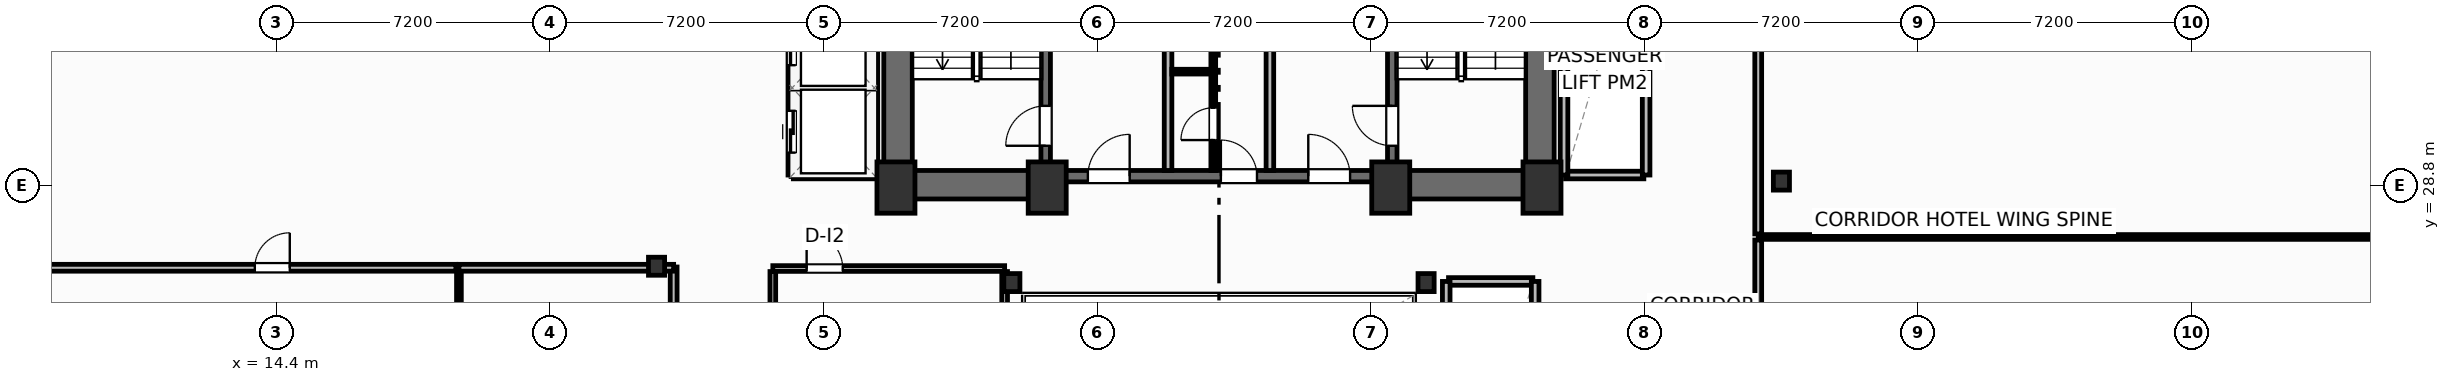
"""IFC4 building model, lengths in metres.
Left out: names, types, materials, properties, quantities, classifications, styles, units other than length and angle.
Written with IfcOpenShell. Run it as: python <this file> out.ifc"""

import sys

from ifc_helpers import new_model, si_unit, direction, frame, frame_2d, origin, origin_2d, place, context, subcontext, project, spatial, rectangle, i_section, extrude, element, fill, save


model = new_model("IFC4")
c1 = context("Model", 3, precision=1e-05, world=origin(), true_north=direction((0.0, 1.0)))
c2 = subcontext(c1, "Body", "Model", "MODEL_VIEW")
j1 = project(units=[si_unit("LENGTHUNIT", "METRE"), si_unit("PLANEANGLEUNIT", "RADIAN")], contexts=[c1])
p1 = place(None, origin())
s1 = spatial("IfcSite", under=j1, at=p1, CompositionType="ELEMENT")
p2 = place(p1, origin())
s2 = spatial("IfcBuilding", under=s1, at=p2, CompositionType="ELEMENT")
p3 = place(p2, frame((0.0, 0.0, 94.7)))
s3 = spatial("IfcBuildingStorey", under=s2, at=p3, CompositionType="ELEMENT", Elevation=94.7)
for number, where, z_axis, x_axis in (
    (1, (30.7, 28.75, 0.0), (0.0, 0.0, 1.0), (1.0, 0.0, 0.0)),
    (2, (34.68, 28.75, 0.0), (0.0, 0.0, 1.0), (1.0, 0.0, 0.0)),
    (3, (43.72, 28.75, 0.0), (0.0, 0.0, 1.0), (1.0, 0.0, 0.0)),
    (4, (47.7, 28.75, 0.0), (0.0, 0.0, 1.0), (1.0, 0.0, 0.0)),
):
    element("IfcColumn", number, at=place(p3, frame(where, z_axis=z_axis, x_axis=x_axis)), inside=s3, PredefinedType="COLUMN", context=c2, shape_type="SweptSolid", body=[
        extrude(rectangle(XDim=1.0, YDim=1.35, at=origin_2d()), origin(), (0.0, 0.0, 1.0), 3.7),
    ])
for number, where, z_axis, x_axis in (
    (5, (33.75, 26.25, 0.0), (0.0, 0.0, 1.0), (1.0, 0.0, 0.0)),
    (6, (44.65, 26.25, 0.0), (0.0, 0.0, 1.0), (1.0, 0.0, 0.0)),
    (7, (24.4, 26.68, 0.0), (0.0, 0.0, 1.0), (1.0, 0.0, 0.0)),
    (8, (54.0, 28.92, 0.0), (0.0, 0.0, 1.0), (1.0, 0.0, 0.0)),
):
    element("IfcColumn", number, at=place(p3, frame(where, z_axis=z_axis, x_axis=x_axis)), inside=s3, PredefinedType="COLUMN", context=c2, shape_type="SweptSolid", body=[
        extrude(i_section(OverallWidth=0.424, OverallDepth=0.474, WebThickness=0.048, FlangeThickness=0.077, FilletRadius=0.025, at=origin_2d()), origin(), (0.0, 0.0, 1.0), 3.7),
    ])
for number, where, z_axis, x_axis in (
    (9, (30.755, 29.2, 0.0), (0.0, 0.0, 1.0), (0.0, 1.0, 0.0)),
    (10, (47.645, 29.2, 0.0), (0.0, 0.0, 1.0), (0.0, 1.0, 0.0)),
):
    element("IfcWall", number, at=place(p3, frame(where, z_axis=z_axis, x_axis=x_axis)), inside=s3, PredefinedType="SHEAR", context=c2, shape_type="SweptSolid", body=[
        extrude(rectangle(XDim=9.22, YDim=0.75, at=frame_2d((4.61, 0.0))), origin(), (0.0, 0.0, 1.0), 3.45),
    ])
p4 = place(p3, frame((30.38, 28.825, 0.0), z_axis=(0.0, 0.0, 1.0), x_axis=(1.0, 0.0, 0.0)))
e11 = element("IfcWall", 11, at=p4, inside=s3, PredefinedType="SHEAR", context=c2, shape_type="SweptSolid", body=[
    extrude(rectangle(XDim=4.42, YDim=0.75, at=frame_2d((2.21, 0.0))), origin(), (0.0, 0.0, 1.0), 3.45),
])
p5 = place(p3, frame((43.6, 28.825, 0.0), z_axis=(0.0, 0.0, 1.0), x_axis=(1.0, 0.0, 0.0)))
e12 = element("IfcWall", 12, at=p5, inside=s3, PredefinedType="SHEAR", context=c2, shape_type="SweptSolid", body=[
    extrude(rectangle(XDim=4.42, YDim=0.75, at=frame_2d((2.21, 0.0))), origin(), (0.0, 0.0, 1.0), 3.45),
])
p6 = place(p3, frame((34.8, 29.05, 0.0), z_axis=(0.0, 0.0, 1.0), x_axis=(1.0, 0.0, 0.0)))
e13 = element("IfcWall", 13, at=p6, inside=s3, PredefinedType="SHEAR", context=c2, shape_type="SweptSolid", body=[
    extrude(rectangle(XDim=8.8, YDim=0.3, at=frame_2d((4.4, 0.0))), origin(), (0.0, 0.0, 1.0), 3.45),
])
p7 = place(p6, frame((0.95, 0.0, 0.0)))
e14 = element("IfcOpeningElement", 14, at=p7, cuts=e13, PredefinedType="OPENING", context=c2, shape_type="SweptSolid", body=[
    extrude(rectangle(XDim=1.1, YDim=2.15, at=frame_2d((0.55, 1.075))), frame((0.0, 0.16, 0.0), z_axis=(0.0, -1.0, 0.0), x_axis=(1.0, 0.0, 0.0)), (0.0, 0.0, 1.0), 0.32),
])
p8 = place(p6, frame((6.75, 0.0, 0.0)))
e15 = element("IfcOpeningElement", 15, at=p8, cuts=e13, PredefinedType="OPENING", context=c2, shape_type="SweptSolid", body=[
    extrude(rectangle(XDim=1.1, YDim=2.15, at=frame_2d((0.55, 1.075))), frame((0.0, 0.16, 0.0), z_axis=(0.0, -1.0, 0.0), x_axis=(1.0, 0.0, 0.0)), (0.0, 0.0, 1.0), 0.32),
])
p9 = place(p6, frame((4.45, 0.0, 0.0)))
e16 = element("IfcOpeningElement", 16, at=p9, cuts=e13, PredefinedType="OPENING", context=c2, shape_type="SweptSolid", body=[
    extrude(rectangle(XDim=0.95, YDim=2.15, at=frame_2d((0.475, 1.075))), frame((0.0, 0.16, 0.0), z_axis=(0.0, -1.0, 0.0), x_axis=(1.0, 0.0, 0.0)), (0.0, 0.0, 1.0), 0.32),
])
p10 = place(p3, frame((34.64, 29.2, 0.0), z_axis=(0.0, 0.0, 1.0), x_axis=(0.0, 1.0, 0.0)))
e17 = element("IfcWall", 17, at=p10, inside=s3, PredefinedType="SHEAR", context=c2, shape_type="SweptSolid", body=[
    extrude(rectangle(XDim=9.22, YDim=0.25, at=frame_2d((4.61, 0.0))), origin(), (0.0, 0.0, 1.0), 3.45),
])
p11 = place(p10, frame((0.65, 0.0, 0.0)))
e18 = element("IfcOpeningElement", 18, at=p11, cuts=e17, PredefinedType="OPENING", context=c2, shape_type="SweptSolid", body=[
    extrude(rectangle(XDim=1.05, YDim=2.15, at=frame_2d((0.525, 1.075))), frame((0.0, 0.135, 0.0), z_axis=(0.0, -1.0, 0.0), x_axis=(1.0, 0.0, 0.0)), (0.0, 0.0, 1.0), 0.27),
])
p12 = place(p3, frame((43.76, 29.2, 0.0), z_axis=(0.0, 0.0, 1.0), x_axis=(0.0, 1.0, 0.0)))
e19 = element("IfcWall", 19, at=p12, inside=s3, PredefinedType="SHEAR", context=c2, shape_type="SweptSolid", body=[
    extrude(rectangle(XDim=9.22, YDim=0.25, at=frame_2d((4.61, 0.0))), origin(), (0.0, 0.0, 1.0), 3.45),
])
p13 = place(p12, frame((0.65, 0.0, 0.0)))
e20 = element("IfcOpeningElement", 20, at=p13, cuts=e19, PredefinedType="OPENING", context=c2, shape_type="SweptSolid", body=[
    extrude(rectangle(XDim=1.05, YDim=2.15, at=frame_2d((0.525, 1.075))), frame((0.0, 0.135, 0.0), z_axis=(0.0, -1.0, 0.0), x_axis=(1.0, 0.0, 0.0)), (0.0, 0.0, 1.0), 0.27),
])
p14 = place(p3, frame((-0.094, 26.64, 0.0), z_axis=(0.0, 0.0, 1.0), x_axis=(1.0, 0.0, 0.0)))
e21 = element("IfcWall", 21, at=p14, inside=s3, PredefinedType="PARTITIONING", context=c2, shape_type="SweptSolid", body=[
    extrude(rectangle(XDim=19.214, YDim=0.18, at=frame_2d((9.607, 0.0))), origin(), (0.0, 0.0, 1.0), 3.45),
])
p15 = place(p14, frame((13.923, 0.0, 0.0)))
e22 = element("IfcOpeningElement", 22, at=p15, cuts=e21, PredefinedType="OPENING", context=c2, shape_type="SweptSolid", body=[
    extrude(rectangle(XDim=0.92, YDim=2.05, at=frame_2d((0.46, 1.025))), frame((0.0, 0.1, 0.0), z_axis=(0.0, -1.0, 0.0), x_axis=(1.0, 0.0, 0.0)), (0.0, 0.0, 1.0), 0.2),
])
p16 = place(p3, frame((24.85, 19.24, 0.0), z_axis=(0.0, 0.0, 1.0), x_axis=(0.0, 1.0, 0.0)))
e23 = element("IfcWall", 23, at=p16, inside=s3, PredefinedType="PARTITIONING", context=c2, shape_type="SweptSolid", body=[
    extrude(rectangle(XDim=7.42, YDim=0.18, at=frame_2d((3.71, 0.0))), origin(), (0.0, 0.0, 1.0), 3.45),
])
p17 = place(p16, frame((2.4, 0.0, 0.0)))
e24 = element("IfcOpeningElement", 24, at=p17, cuts=e23, PredefinedType="OPENING", context=c2, shape_type="SweptSolid", body=[
    extrude(rectangle(XDim=0.92, YDim=2.05, at=frame_2d((0.46, 1.025))), frame((0.0, 0.1, 0.0), z_axis=(0.0, -1.0, 0.0), x_axis=(1.0, 0.0, 0.0)), (0.0, 0.0, 1.0), 0.2),
])
p18 = place(p3, frame((19.2, 19.24, 0.0), z_axis=(0.0, 0.0, 1.0), x_axis=(0.0, 1.0, 0.0)))
e25 = element("IfcWall", 25, at=p18, inside=s3, PredefinedType="PARTITIONING", context=c2, shape_type="SweptSolid", body=[
    extrude(rectangle(XDim=7.42, YDim=0.125, at=frame_2d((3.71, 0.0))), origin(), (0.0, 0.0, 1.0), 3.45),
])
p19 = place(p3, frame((19.2, 26.64, 0.0), z_axis=(0.0, 0.0, 1.0), x_axis=(1.0, 0.0, 0.0)))
e26 = element("IfcWall", 26, at=p19, inside=s3, PredefinedType="PARTITIONING", context=c2, shape_type="SweptSolid", body=[
    extrude(rectangle(XDim=5.65, YDim=0.18, at=frame_2d((2.825, 0.0))), origin(), (0.0, 0.0, 1.0), 2.662),
])
p20 = place(p3, frame((53.39, 19.3, 0.0), z_axis=(0.0, 0.0, 1.0), x_axis=(0.0, 1.0, 0.0)))
e27 = element("IfcWall", 27, at=p20, inside=s3, PredefinedType="PARTITIONING", context=c2, shape_type="SweptSolid", body=[
    extrude(rectangle(XDim=8.07, YDim=0.18, at=frame_2d((4.035, 0.0))), origin(), (0.0, 0.0, 1.0), 3.45),
])
p21 = place(p20, frame((2.2, 0.0, 0.0)))
e28 = element("IfcOpeningElement", 28, at=p21, cuts=e27, PredefinedType="OPENING", context=c2, shape_type="SweptSolid", body=[
    extrude(rectangle(XDim=0.92, YDim=2.05, at=frame_2d((0.46, 1.025))), frame((0.0, 0.1, 0.0), z_axis=(0.0, -1.0, 0.0), x_axis=(1.0, 0.0, 0.0)), (0.0, 0.0, 1.0), 0.2),
])
p22 = place(p3, frame((53.39, 27.53, 0.0), z_axis=(0.0, 0.0, 1.0), x_axis=(0.0, 1.0, 0.0)))
e29 = element("IfcWall", 29, at=p22, inside=s3, PredefinedType="PARTITIONING", context=c2, shape_type="SweptSolid", body=[
    extrude(rectangle(XDim=11.67, YDim=0.18, at=frame_2d((5.835, 0.0))), origin(), (0.0, 0.0, 1.0), 3.45),
])
p23 = place(p22, frame((5.8, 0.0, 0.0)))
e30 = element("IfcOpeningElement", 30, at=p23, cuts=e29, PredefinedType="OPENING", context=c2, shape_type="SweptSolid", body=[
    extrude(rectangle(XDim=0.92, YDim=2.05, at=frame_2d((0.46, 1.025))), frame((0.0, 0.1, 0.0), z_axis=(0.0, -1.0, 0.0), x_axis=(1.0, 0.0, 0.0)), (0.0, 0.0, 1.0), 0.2),
])
p24 = place(p3, frame((53.39, 27.45, 0.0), z_axis=(0.0, 0.0, 1.0), x_axis=(1.0, 0.0, 0.0)))
e31 = element("IfcWall", 31, at=p24, inside=s3, PredefinedType="PARTITIONING", context=c2, shape_type="SweptSolid", body=[
    extrude(rectangle(XDim=23.61, YDim=0.125, at=frame_2d((11.805, 0.0))), origin(), (0.0, 0.0, 1.0), 3.45),
])
for number, where, z_axis, x_axis in (
    (32, (37.86, 29.2, 0.0), (0.0, 0.0, 1.0), (0.0, 1.0, 0.0)),
    (33, (40.54, 29.2, 0.0), (0.0, 0.0, 1.0), (0.0, 1.0, 0.0)),
):
    element("IfcWall", number, at=place(p3, frame(where, z_axis=z_axis, x_axis=x_axis)), inside=s3, PredefinedType="PARTITIONING", context=c2, shape_type="SweptSolid", body=[
        extrude(rectangle(XDim=5.18, YDim=0.2, at=frame_2d((2.59, 0.0))), origin(), (0.0, 0.0, 1.0), 3.45),
    ])
p25 = place(p3, frame((37.96, 31.8, 0.0), z_axis=(0.0, 0.0, 1.0), x_axis=(1.0, 0.0, 0.0)))
e34 = element("IfcWall", 34, at=p25, inside=s3, PredefinedType="PARTITIONING", context=c2, shape_type="SweptSolid", body=[
    extrude(rectangle(XDim=1.09, YDim=0.125, at=frame_2d((0.545, 0.0))), origin(), (0.0, 0.0, 1.0), 3.45),
])
p26 = place(p3, frame((39.05, 29.2, 0.0), z_axis=(0.0, 0.0, 1.0), x_axis=(0.0, 1.0, 0.0)))
e35 = element("IfcWall", 35, at=p26, inside=s3, PredefinedType="PARTITIONING", context=c2, shape_type="SweptSolid", body=[
    extrude(rectangle(XDim=5.22, YDim=0.125, at=frame_2d((2.61, 0.0))), origin(), (0.0, 0.0, 1.0), 3.45),
])
p27 = place(p26, frame((0.8, 0.0, 0.0)))
e36 = element("IfcOpeningElement", 36, at=p27, cuts=e35, PredefinedType="OPENING", context=c2, shape_type="SweptSolid", body=[
    extrude(rectangle(XDim=0.85, YDim=2.05, at=frame_2d((0.425, 1.025))), frame((0.0, 0.073, 0.0), z_axis=(0.0, -1.0, 0.0), x_axis=(1.0, 0.0, 0.0)), (0.0, 0.0, 1.0), 0.145),
])
p28 = place(p26, frame((3.4, 0.0, 0.0)))
e37 = element("IfcOpeningElement", 37, at=p28, cuts=e35, PredefinedType="OPENING", context=c2, shape_type="SweptSolid", body=[
    extrude(rectangle(XDim=0.85, YDim=2.05, at=frame_2d((0.425, 1.025))), frame((0.0, 0.073, 0.0), z_axis=(0.0, -1.0, 0.0), x_axis=(1.0, 0.0, 0.0)), (0.0, 0.0, 1.0), 0.145),
])
p29 = place(p3, frame((27.46, 26.62, 0.0), z_axis=(0.0, 0.0, 1.0), x_axis=(1.0, 0.0, 0.0)))
e38 = element("IfcWall", 38, at=p29, inside=s3, PredefinedType="PARTITIONING", context=c2, shape_type="SweptSolid", body=[
    extrude(rectangle(XDim=6.1, YDim=0.15, at=frame_2d((3.05, 0.0))), origin(), (0.0, 0.0, 1.0), 2.662),
])
p30 = place(p29, frame((0.89, 0.0, 0.0)))
e39 = element("IfcOpeningElement", 39, at=p30, cuts=e38, PredefinedType="OPENING", context=c2, shape_type="SweptSolid", body=[
    extrude(rectangle(XDim=0.95, YDim=2.05, at=frame_2d((0.475, 1.025))), frame((0.0, 0.085, 0.0), z_axis=(0.0, -1.0, 0.0), x_axis=(1.0, 0.0, 0.0)), (0.0, 0.0, 1.0), 0.17),
])
p31 = place(p3, frame((27.46, 19.38, 0.0), z_axis=(0.0, 0.0, 1.0), x_axis=(0.0, 1.0, 0.0)))
e40 = element("IfcWall", 40, at=p31, inside=s3, PredefinedType="PARTITIONING", context=c2, shape_type="SweptSolid", body=[
    extrude(rectangle(XDim=7.16, YDim=0.15, at=frame_2d((3.58, 0.0))), origin(), (0.0, 0.0, 1.0), 3.45),
])
p32 = place(p31, frame((1.1, 0.0, 0.0)))
e41 = element("IfcOpeningElement", 41, at=p32, cuts=e40, PredefinedType="OPENING", context=c2, shape_type="SweptSolid", body=[
    extrude(rectangle(XDim=0.9, YDim=2.05, at=frame_2d((0.45, 1.025))), frame((0.0, 0.085, 0.0), z_axis=(0.0, -1.0, 0.0), x_axis=(1.0, 0.0, 0.0)), (0.0, 0.0, 1.0), 0.17),
])
p33 = place(p3, frame((33.56, 19.38, 0.0), z_axis=(0.0, 0.0, 1.0), x_axis=(0.0, 1.0, 0.0)))
e42 = element("IfcWall", 42, at=p33, inside=s3, PredefinedType="PARTITIONING", context=c2, shape_type="SweptSolid", body=[
    extrude(rectangle(XDim=7.16, YDim=0.15, at=frame_2d((3.58, 0.0))), origin(), (0.0, 0.0, 1.0), 2.824),
])
p34 = place(p3, frame((28.02, 31.375, 0.0), z_axis=(0.0, 0.0, 1.0), x_axis=(1.0, 0.0, 0.0)))
e43 = element("IfcWall", 43, at=p34, inside=s3, PredefinedType="PARTITIONING", context=c2, shape_type="SweptSolid", body=[
    extrude(rectangle(XDim=2.06, YDim=0.2, at=frame_2d((1.03, 0.0))), origin(), (0.0, 0.0, 1.0), 3.45),
])
p35 = place(p3, frame((28.0, 29.08, 0.0), z_axis=(0.0, 0.0, 1.0), x_axis=(1.0, 0.0, 0.0)))
e44 = element("IfcWall", 44, at=p35, inside=s3, PredefinedType="PARTITIONING", context=c2, shape_type="SweptSolid", body=[
    extrude(rectangle(XDim=2.1, YDim=0.2, at=frame_2d((1.05, 0.0))), origin(), (0.0, 0.0, 1.0), 3.45),
])
p36 = place(p3, frame((30.12, 29.08, 0.0), z_axis=(0.0, 0.0, 1.0), x_axis=(0.0, 1.0, 0.0)))
e45 = element("IfcWall", 45, at=p36, inside=s3, PredefinedType="PARTITIONING", context=c2, shape_type="SweptSolid", body=[
    extrude(rectangle(XDim=6.89, YDim=0.2, at=frame_2d((3.445, 0.0))), origin(), (0.0, 0.0, 1.0), 3.45),
])
p37 = place(p3, frame((27.96, 29.08, 0.0), z_axis=(0.0, 0.0, 1.0), x_axis=(0.0, 1.0, 0.0)))
e46 = element("IfcWall", 46, at=p37, inside=s3, PredefinedType="PARTITIONING", context=c2, shape_type="SweptSolid", body=[
    extrude(rectangle(XDim=6.89, YDim=0.2, at=frame_2d((3.445, 0.0))), origin(), (0.0, 0.0, 1.0), 3.45),
])
p38 = place(p37, frame((0.59, 0.0, 0.0)))
e47 = element("IfcOpeningElement", 47, at=p38, cuts=e46, PredefinedType="OPENING", context=c2, shape_type="SweptSolid", body=[
    extrude(rectangle(XDim=1.1, YDim=2.15, at=frame_2d((0.55, 1.075))), frame((0.0, 0.11, 0.0), z_axis=(0.0, -1.0, 0.0), x_axis=(1.0, 0.0, 0.0)), (0.0, 0.0, 1.0), 0.22),
])
p39 = place(p37, frame((2.89, 0.0, 0.0)))
e48 = element("IfcOpeningElement", 48, at=p39, cuts=e46, PredefinedType="OPENING", context=c2, shape_type="SweptSolid", body=[
    extrude(rectangle(XDim=1.1, YDim=2.15, at=frame_2d((0.55, 1.075))), frame((0.0, 0.11, 0.0), z_axis=(0.0, -1.0, 0.0), x_axis=(1.0, 0.0, 0.0)), (0.0, 0.0, 1.0), 0.22),
])
p40 = place(p37, frame((5.19, 0.0, 0.0)))
e49 = element("IfcOpeningElement", 49, at=p40, cuts=e46, PredefinedType="OPENING", context=c2, shape_type="SweptSolid", body=[
    extrude(rectangle(XDim=1.1, YDim=2.15, at=frame_2d((0.55, 1.075))), frame((0.0, 0.11, 0.0), z_axis=(0.0, -1.0, 0.0), x_axis=(1.0, 0.0, 0.0)), (0.0, 0.0, 1.0), 0.22),
])
p41 = place(p3, frame((48.32, 31.375, 0.0), z_axis=(0.0, 0.0, 1.0), x_axis=(1.0, 0.0, 0.0)))
e50 = element("IfcWall", 50, at=p41, inside=s3, PredefinedType="PARTITIONING", context=c2, shape_type="SweptSolid", body=[
    extrude(rectangle(XDim=2.06, YDim=0.2, at=frame_2d((1.03, 0.0))), origin(), (0.0, 0.0, 1.0), 3.45),
])
p42 = place(p3, frame((48.32, 29.08, 0.0), z_axis=(0.0, 0.0, 1.0), x_axis=(1.0, 0.0, 0.0)))
e51 = element("IfcWall", 51, at=p42, inside=s3, PredefinedType="PARTITIONING", context=c2, shape_type="SweptSolid", body=[
    extrude(rectangle(XDim=2.06, YDim=0.2, at=frame_2d((1.03, 0.0))), origin(), (0.0, 0.0, 1.0), 2.662),
])
for number, where, z_axis, x_axis in (
    (52, (48.28, 29.08, 0.0), (0.0, 0.0, 1.0), (0.0, 1.0, 0.0)),
    (53, (50.44, 29.08, 0.0), (0.0, 0.0, 1.0), (0.0, 1.0, 0.0)),
):
    element("IfcWall", number, at=place(p3, frame(where, z_axis=z_axis, x_axis=x_axis)), inside=s3, PredefinedType="PARTITIONING", context=c2, shape_type="SweptSolid", body=[
        extrude(rectangle(XDim=6.89, YDim=0.2, at=frame_2d((3.445, 0.0))), origin(), (0.0, 0.0, 1.0), 3.45),
    ])
p43 = place(p3, frame((45.24, 26.28, 0.0), z_axis=(0.0, 0.0, 1.0), x_axis=(1.0, 0.0, 0.0)))
e54 = element("IfcWall", 54, at=p43, inside=s3, PredefinedType="PARTITIONING", context=c2, shape_type="SweptSolid", body=[
    extrude(rectangle(XDim=2.22, YDim=0.2, at=frame_2d((1.11, 0.0))), origin(), (0.0, 0.0, 1.0), 3.45),
])
for number, where, z_axis, x_axis in (
    (55, (45.18, 19.38, 0.0), (0.0, 0.0, 1.0), (0.0, 1.0, 0.0)),
    (56, (47.52, 19.38, 0.0), (0.0, 0.0, 1.0), (0.0, 1.0, 0.0)),
):
    element("IfcWall", number, at=place(p3, frame(where, z_axis=z_axis, x_axis=x_axis)), inside=s3, PredefinedType="PARTITIONING", context=c2, shape_type="SweptSolid", body=[
        extrude(rectangle(XDim=6.9, YDim=0.2, at=frame_2d((3.45, 0.0))), origin(), (0.0, 0.0, 1.0), 3.45),
    ])
p44 = place(p15, origin())
e57 = element("IfcDoor", 57, at=p44, inside=s3, OperationType="SINGLE_SWING_RIGHT", PredefinedType="DOOR", context=c2, shape_type="SweptSolid", body=[
    extrude(rectangle(XDim=0.92, YDim=2.05, at=frame_2d((0.46, 1.025))), frame((0.0, 0.025, 0.0), z_axis=(0.0, -1.0, 0.0), x_axis=(1.0, 0.0, 0.0)), (0.0, 0.0, 1.0), 0.05),
])
fill(e22, e57)
p45 = place(p11, origin())
e58 = element("IfcDoor", 58, at=p45, inside=s3, OperationType="SINGLE_SWING_LEFT", PredefinedType="DOOR", context=c2, shape_type="SweptSolid", body=[
    extrude(rectangle(XDim=1.05, YDim=2.15, at=frame_2d((0.525, 1.075))), frame((0.0, 0.025, 0.0), z_axis=(0.0, -1.0, 0.0), x_axis=(1.0, 0.0, 0.0)), (0.0, 0.0, 1.0), 0.05),
])
fill(e18, e58)
p46 = place(p13, origin())
e59 = element("IfcDoor", 59, at=p46, inside=s3, OperationType="SINGLE_SWING_RIGHT", PredefinedType="DOOR", context=c2, shape_type="SweptSolid", body=[
    extrude(rectangle(XDim=1.05, YDim=2.15, at=frame_2d((0.525, 1.075))), frame((0.0, 0.025, 0.0), z_axis=(0.0, -1.0, 0.0), x_axis=(1.0, 0.0, 0.0)), (0.0, 0.0, 1.0), 0.05),
])
fill(e20, e59)
p47 = place(p7, origin())
e60 = element("IfcDoor", 60, at=p47, inside=s3, OperationType="SINGLE_SWING_RIGHT", PredefinedType="DOOR", context=c2, shape_type="SweptSolid", body=[
    extrude(rectangle(XDim=1.1, YDim=2.15, at=frame_2d((0.55, 1.075))), frame((0.0, 0.025, 0.0), z_axis=(0.0, -1.0, 0.0), x_axis=(1.0, 0.0, 0.0)), (0.0, 0.0, 1.0), 0.05),
])
fill(e14, e60)
p48 = place(p8, origin())
e61 = element("IfcDoor", 61, at=p48, inside=s3, OperationType="SINGLE_SWING_LEFT", PredefinedType="DOOR", context=c2, shape_type="SweptSolid", body=[
    extrude(rectangle(XDim=1.1, YDim=2.15, at=frame_2d((0.55, 1.075))), frame((0.0, 0.025, 0.0), z_axis=(0.0, -1.0, 0.0), x_axis=(1.0, 0.0, 0.0)), (0.0, 0.0, 1.0), 0.05),
])
fill(e15, e61)
p49 = place(p27, origin())
e62 = element("IfcDoor", 62, at=p49, inside=s3, OperationType="SINGLE_SWING_LEFT", PredefinedType="DOOR", context=c2, shape_type="SweptSolid", body=[
    extrude(rectangle(XDim=0.85, YDim=2.05, at=frame_2d((0.425, 1.025))), frame((0.0, 0.025, 0.0), z_axis=(0.0, -1.0, 0.0), x_axis=(1.0, 0.0, 0.0)), (0.0, 0.0, 1.0), 0.05),
])
fill(e36, e62)
p50 = place(p9, origin())
e63 = element("IfcDoor", 63, at=p50, inside=s3, OperationType="SINGLE_SWING_LEFT", PredefinedType="DOOR", context=c2, shape_type="SweptSolid", body=[
    extrude(rectangle(XDim=0.95, YDim=2.15, at=frame_2d((0.475, 1.075))), frame((0.0, 0.025, 0.0), z_axis=(0.0, -1.0, 0.0), x_axis=(1.0, 0.0, 0.0)), (0.0, 0.0, 1.0), 0.05),
])
fill(e16, e63)
p51 = place(p30, origin())
e64 = element("IfcDoor", 64, at=p51, inside=s3, OperationType="SINGLE_SWING_LEFT", PredefinedType="DOOR", context=c2, shape_type="SweptSolid", body=[
    extrude(rectangle(XDim=0.95, YDim=2.05, at=frame_2d((0.475, 1.025))), frame((0.0, 0.025, 0.0), z_axis=(0.0, -1.0, 0.0), x_axis=(1.0, 0.0, 0.0)), (0.0, 0.0, 1.0), 0.05),
])
fill(e39, e64)
p52 = place(p38, origin())
e65 = element("IfcDoor", 65, at=p52, inside=s3, OperationType="SLIDING_TO_LEFT", PredefinedType="DOOR", context=c2, shape_type="SweptSolid", body=[
    extrude(rectangle(XDim=1.1, YDim=2.15, at=frame_2d((0.55, 1.075))), frame((0.0, 0.025, 0.0), z_axis=(0.0, -1.0, 0.0), x_axis=(1.0, 0.0, 0.0)), (0.0, 0.0, 1.0), 0.05),
])
fill(e47, e65)
p53 = place(p39, origin())
e66 = element("IfcDoor", 66, at=p53, inside=s3, OperationType="SLIDING_TO_LEFT", PredefinedType="DOOR", context=c2, shape_type="SweptSolid", body=[
    extrude(rectangle(XDim=1.1, YDim=2.15, at=frame_2d((0.55, 1.075))), frame((0.0, 0.025, 0.0), z_axis=(0.0, -1.0, 0.0), x_axis=(1.0, 0.0, 0.0)), (0.0, 0.0, 1.0), 0.05),
])
fill(e48, e66)
save(model, sys.argv[1])
